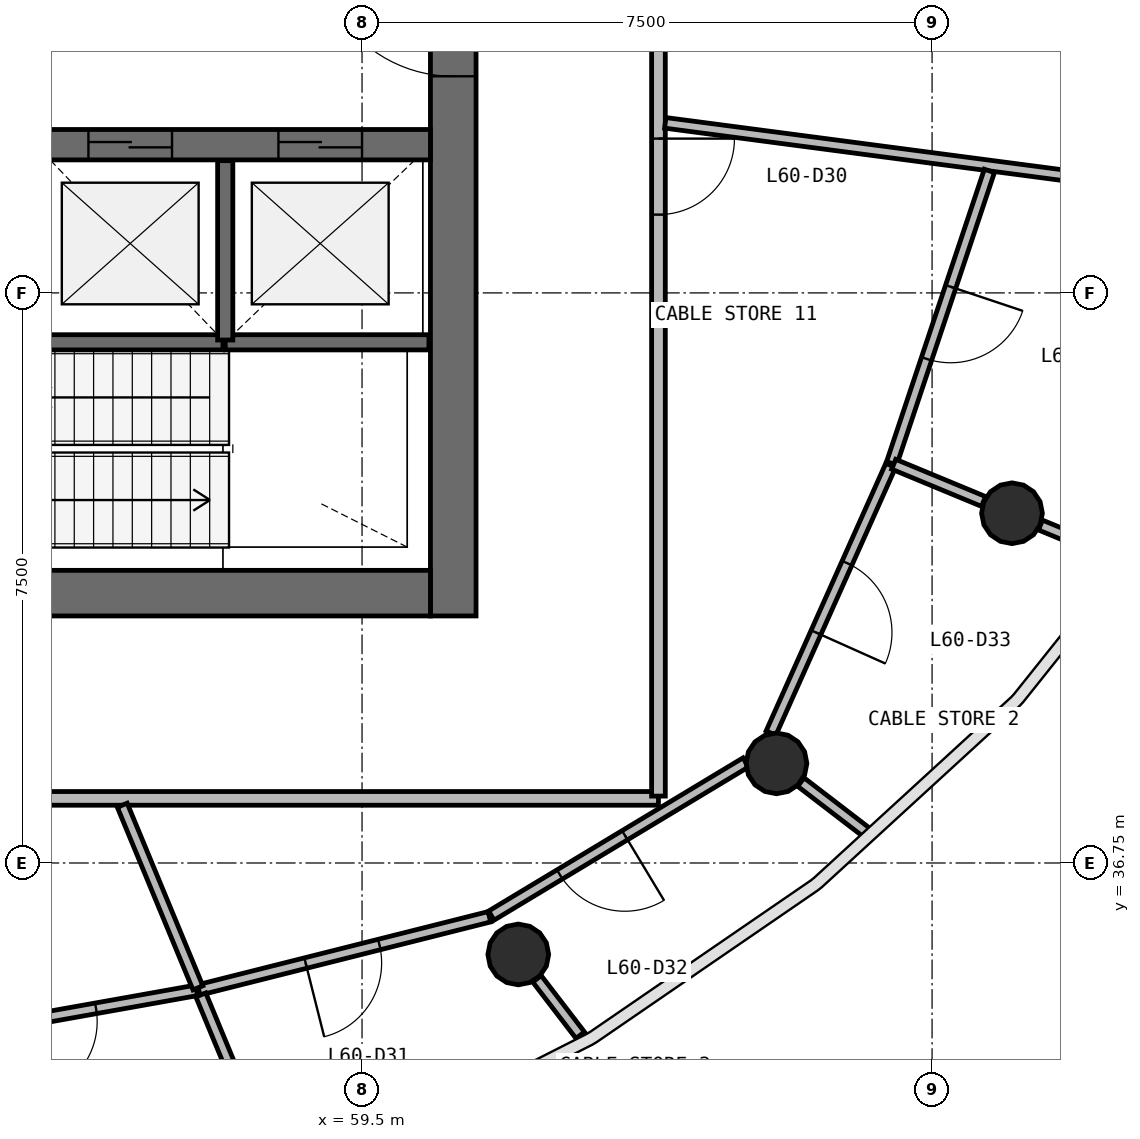
"""IFC4 building model, lengths in metres.
Left out: names, types, materials, properties, quantities, classifications, styles, units other than length and angle.
Written with IfcOpenShell. Run it as: python <this file> out.ifc"""

import sys

from ifc_helpers import new_model, si_unit, direction, frame, frame_2d, origin, origin_2d, place, context, subcontext, project, spatial, rectangle, circle, extrude, source, transform, mapped, element, fill, save


model = new_model("IFC4")
c1 = context("Model", 3, precision=1e-05, world=origin(), true_north=direction((0.0, 1.0)))
c2 = subcontext(c1, "Body", "Model", "MODEL_VIEW")
j1 = project(units=[si_unit("LENGTHUNIT", "METRE"), si_unit("PLANEANGLEUNIT", "RADIAN")], contexts=[c1])
p1 = place(None, origin())
s1 = spatial("IfcSite", under=j1, at=p1, CompositionType="ELEMENT")
p2 = place(p1, origin())
s2 = spatial("IfcBuilding", under=s1, at=p2, CompositionType="ELEMENT")
p3 = place(p2, frame((0.0, 0.0, 246.2)))
s3 = spatial("IfcBuildingStorey", under=s2, at=p3, CompositionType="ELEMENT", Elevation=246.2)
p4 = place(p3, frame((60.7, 40.0, 0.0), z_axis=(0.0, 0.0, 1.0), x_axis=(0.0, 1.0, 0.0)))
e1 = element("IfcWall", 1, at=p4, inside=s3, PredefinedType="SHEAR", context=c2, shape_type="SweptSolid", body=[
    extrude(rectangle(XDim=16.0, YDim=0.6, at=frame_2d((8.0, 0.0))), origin(), (0.0, 0.0, 1.0), 3.9),
])
p5 = place(p4, frame((7.1, 0.0, 0.0)))
e2 = element("IfcOpeningElement", 2, at=p5, cuts=e1, PredefinedType="OPENING", context=c2, shape_type="SweptSolid", body=[
    extrude(rectangle(XDim=1.8, YDim=2.1, at=frame_2d((0.9, 1.05))), frame((0.0, 0.31, 0.0), z_axis=(0.0, -1.0, 0.0), x_axis=(1.0, 0.0, 0.0)), (0.0, 0.0, 1.0), 0.62),
])
p6 = place(p3, frame((43.6, 40.3, 0.0), z_axis=(0.0, 0.0, 1.0), x_axis=(1.0, 0.0, 0.0)))
e3 = element("IfcWall", 3, at=p6, inside=s3, PredefinedType="SHEAR", context=c2, shape_type="SweptSolid", body=[
    extrude(rectangle(XDim=16.8, YDim=0.6, at=frame_2d((8.4, 0.0))), origin(), (0.0, 0.0, 1.0), 3.9),
])
p7 = place(p6, frame((10.3, 0.0, 0.0)))
e4 = element("IfcOpeningElement", 4, at=p7, cuts=e3, PredefinedType="OPENING", context=c2, shape_type="SweptSolid", body=[
    extrude(rectangle(XDim=1.2, YDim=2.1, at=frame_2d((0.6, 1.05))), frame((0.0, 0.31, 0.0), z_axis=(0.0, -1.0, 0.0), x_axis=(1.0, 0.0, 0.0)), (0.0, 0.0, 1.0), 0.62),
])
p8 = place(p6, frame((7.25, 0.0, 0.0)))
e5 = element("IfcOpeningElement", 5, at=p8, cuts=e3, PredefinedType="OPENING", context=c2, shape_type="SweptSolid", body=[
    extrude(rectangle(XDim=1.1, YDim=2.1, at=frame_2d((0.55, 1.05))), frame((0.0, 0.31, 0.0), z_axis=(0.0, -1.0, 0.0), x_axis=(1.0, 0.0, 0.0)), (0.0, 0.0, 1.0), 0.62),
])
p9 = place(p6, frame((0.7, 0.0, 0.0)))
e6 = element("IfcOpeningElement", 6, at=p9, cuts=e3, PredefinedType="OPENING", context=c2, shape_type="SweptSolid", body=[
    extrude(rectangle(XDim=0.8, YDim=2.1, at=frame_2d((0.4, 1.05))), frame((0.0, 0.31, 0.0), z_axis=(0.0, -1.0, 0.0), x_axis=(1.0, 0.0, 0.0)), (0.0, 0.0, 1.0), 0.62),
])
p10 = place(p3, frame((43.6, 46.2, 0.0), z_axis=(0.0, 0.0, 1.0), x_axis=(1.0, 0.0, 0.0)))
e7 = element("IfcWall", 7, at=p10, inside=s3, PredefinedType="SHEAR", context=c2, shape_type="SweptSolid", body=[
    extrude(rectangle(XDim=16.8, YDim=0.4, at=frame_2d((8.4, 0.0))), origin(), (0.0, 0.0, 1.0), 3.9),
])
p11 = place(p10, frame((9.8, 0.0, 0.0)))
e8 = element("IfcOpeningElement", 8, at=p11, cuts=e7, PredefinedType="OPENING", context=c2, shape_type="SweptSolid", body=[
    extrude(rectangle(XDim=1.1, YDim=2.1, at=frame_2d((0.55, 1.05))), frame((0.0, 0.21, 0.0), z_axis=(0.0, -1.0, 0.0), x_axis=(1.0, 0.0, 0.0)), (0.0, 0.0, 1.0), 0.42),
])
p12 = place(p10, frame((12.3, 0.0, 0.0)))
e9 = element("IfcOpeningElement", 9, at=p12, cuts=e7, PredefinedType="OPENING", context=c2, shape_type="SweptSolid", body=[
    extrude(rectangle(XDim=1.1, YDim=2.1, at=frame_2d((0.55, 1.05))), frame((0.0, 0.21, 0.0), z_axis=(0.0, -1.0, 0.0), x_axis=(1.0, 0.0, 0.0)), (0.0, 0.0, 1.0), 0.42),
])
p13 = place(p10, frame((14.8, 0.0, 0.0)))
e10 = element("IfcOpeningElement", 10, at=p13, cuts=e7, PredefinedType="OPENING", context=c2, shape_type="SweptSolid", body=[
    extrude(rectangle(XDim=1.1, YDim=2.1, at=frame_2d((0.55, 1.05))), frame((0.0, 0.21, 0.0), z_axis=(0.0, -1.0, 0.0), x_axis=(1.0, 0.0, 0.0)), (0.0, 0.0, 1.0), 0.42),
])
p14 = place(p10, frame((2.45, 0.0, 0.0)))
e11 = element("IfcOpeningElement", 11, at=p14, cuts=e7, PredefinedType="OPENING", context=c2, shape_type="SweptSolid", body=[
    extrude(rectangle(XDim=0.9, YDim=2.1, at=frame_2d((0.45, 1.05))), frame((0.0, 0.21, 0.0), z_axis=(0.0, -1.0, 0.0), x_axis=(1.0, 0.0, 0.0)), (0.0, 0.0, 1.0), 0.42),
])
p15 = place(p10, frame((7.85, 0.0, 0.0)))
e12 = element("IfcOpeningElement", 12, at=p15, cuts=e7, PredefinedType="OPENING", context=c2, shape_type="SweptSolid", body=[
    extrude(rectangle(XDim=0.9, YDim=2.1, at=frame_2d((0.45, 1.05))), frame((0.0, 0.21, 0.0), z_axis=(0.0, -1.0, 0.0), x_axis=(1.0, 0.0, 0.0)), (0.0, 0.0, 1.0), 0.42),
])
m1 = source(origin(), c2, "Body", "SweptSolid", [
    extrude(circle(Radius=0.4, at=origin_2d()), origin(), (0.0, 0.0, 1.0), 3.9),
])
for number, where, z_axis, x_axis in (
    (13, (61.556, 35.547, 0.0), (0.0, 0.0, 1.0), (1.0, 0.0, 0.0)),
    (14, (64.953, 38.061, 0.0), (0.0, 0.0, 1.0), (1.0, 0.0, 0.0)),
    (15, (68.052, 41.351, 0.0), (0.0, 0.0, 1.0), (1.0, 0.0, 0.0)),
):
    element("IfcColumn", number, at=place(p3, frame(where, z_axis=z_axis, x_axis=x_axis)), inside=s3, PredefinedType="COLUMN", context=c2, shape_type="MappedRepresentation", body=[
        mapped(m1, transform((0.0, 0.0, 0.0), scale=1.0)),
    ])
p16 = place(p3, frame((57.7, 43.6, 0.0), z_axis=(0.0, 0.0, 1.0), x_axis=(1.0, 0.0, 0.0)))
e16 = element("IfcWall", 16, at=p16, inside=s3, PredefinedType="SOLIDWALL", context=c2, shape_type="SweptSolid", body=[
    extrude(rectangle(XDim=2.68, YDim=0.2, at=frame_2d((1.34, 0.0))), origin(), (0.0, 0.0, 1.0), 3.58),
])
p17 = place(p3, frame((55.2, 43.6, 0.0), z_axis=(0.0, 0.0, 1.0), x_axis=(1.0, 0.0, 0.0)))
e17 = element("IfcWall", 17, at=p17, inside=s3, PredefinedType="SOLIDWALL", context=c2, shape_type="SweptSolid", body=[
    extrude(rectangle(XDim=2.47, YDim=0.2, at=frame_2d((1.235, 0.0))), origin(), (0.0, 0.0, 1.0), 3.58),
])
p18 = place(p3, frame((57.7, 43.63, 0.0), z_axis=(0.0, 0.0, 1.0), x_axis=(0.0, 1.0, 0.0)))
e18 = element("IfcWall", 18, at=p18, inside=s3, PredefinedType="SOLIDWALL", context=c2, shape_type="SweptSolid", body=[
    extrude(rectangle(XDim=2.36, YDim=0.2, at=frame_2d((1.18, 0.0))), origin(), (0.0, 0.0, 1.0), 3.58),
])
p19 = place(p3, frame((63.4, 37.6, 0.0), z_axis=(0.0, 0.0, 1.0), x_axis=(-1.0, 0.0, 0.0)))
e19 = element("IfcWall", 19, at=p19, inside=s3, PredefinedType="PARTITIONING", context=c2, shape_type="SweptSolid", body=[
    extrude(rectangle(XDim=22.8, YDim=0.18, at=frame_2d((11.4, 0.0))), origin(), (0.0, 0.0, 1.0), 2.88),
])
p20 = place(p19, frame((12.95, 0.0, 0.0)))
e20 = element("IfcOpeningElement", 20, at=p20, cuts=e19, PredefinedType="OPENING", context=c2, shape_type="SweptSolid", body=[
    extrude(rectangle(XDim=1.0, YDim=2.1, at=frame_2d((0.5, 1.05))), frame((0.0, 0.1, 0.0), z_axis=(0.0, -1.0, 0.0), x_axis=(1.0, 0.0, 0.0)), (0.0, 0.0, 1.0), 0.2),
])
p21 = place(p19, frame((10.95, 0.0, 0.0)))
e21 = element("IfcOpeningElement", 21, at=p21, cuts=e19, PredefinedType="OPENING", context=c2, shape_type="SweptSolid", body=[
    extrude(rectangle(XDim=1.0, YDim=2.1, at=frame_2d((0.5, 1.05))), frame((0.0, 0.1, 0.0), z_axis=(0.0, -1.0, 0.0), x_axis=(1.0, 0.0, 0.0)), (0.0, 0.0, 1.0), 0.2),
])
p22 = place(p3, frame((63.4, 58.37, 0.0), z_axis=(0.0, 0.0, 1.0), x_axis=(0.0, -1.0, 0.0)))
e22 = element("IfcWall", 22, at=p22, inside=s3, PredefinedType="PARTITIONING", context=c2, shape_type="SweptSolid", body=[
    extrude(rectangle(XDim=20.74, YDim=0.18, at=frame_2d((10.37, 0.0))), origin(), (0.0, 0.0, 1.0), 2.88),
])
p23 = place(p22, frame((12.09, 0.0, 0.0)))
e23 = element("IfcOpeningElement", 23, at=p23, cuts=e22, PredefinedType="OPENING", context=c2, shape_type="SweptSolid", body=[
    extrude(rectangle(XDim=1.0, YDim=2.1, at=frame_2d((0.5, 1.05))), frame((0.0, 0.1, 0.0), z_axis=(0.0, -1.0, 0.0), x_axis=(1.0, 0.0, 0.0)), (0.0, 0.0, 1.0), 0.2),
])
p24 = place(p22, frame((9.89, 0.0, 0.0)))
e24 = element("IfcOpeningElement", 24, at=p24, cuts=e22, PredefinedType="OPENING", context=c2, shape_type="SweptSolid", body=[
    extrude(rectangle(XDim=1.0, YDim=2.1, at=frame_2d((0.5, 1.05))), frame((0.0, 0.1, 0.0), z_axis=(0.0, -1.0, 0.0), x_axis=(1.0, 0.0, 0.0)), (0.0, 0.0, 1.0), 0.2),
])
p25 = place(p22, frame((4.29, 0.0, 0.0)))
e25 = element("IfcOpeningElement", 25, at=p25, cuts=e22, PredefinedType="OPENING", context=c2, shape_type="SweptSolid", body=[
    extrude(rectangle(XDim=1.0, YDim=2.1, at=frame_2d((0.5, 1.05))), frame((0.0, 0.1, 0.0), z_axis=(0.0, -1.0, 0.0), x_axis=(1.0, 0.0, 0.0)), (0.0, 0.0, 1.0), 0.2),
])
p26 = place(p3, frame((70.139, 45.612, 0.0), z_axis=(0.0, 0.0, 1.0), x_axis=(-0.991446859335, 0.130511015301, 0.0)))
e26 = element("IfcWall", 26, at=p26, inside=s3, PredefinedType="PARTITIONING", context=c2, shape_type="SweptSolid", body=[
    extrude(rectangle(XDim=6.706, YDim=0.14, at=frame_2d((3.353, 0.0))), origin(), (0.0, 0.0, 1.0), 2.88),
])
p27 = place(p3, frame((67.754, 45.855, 0.0), z_axis=(0.0, 0.0, 1.0), x_axis=(-0.317003922607, -0.94842422631, 0.0)))
e27 = element("IfcWall", 27, at=p27, inside=s3, PredefinedType="PARTITIONING", context=c2, shape_type="SweptSolid", body=[
    extrude(rectangle(XDim=4.057, YDim=0.14, at=frame_2d((2.029, 0.0))), origin(), (0.0, 0.0, 1.0), 2.88),
])
p28 = place(p27, frame((1.607, 0.0, 0.0)))
e28 = element("IfcOpeningElement", 28, at=p28, cuts=e27, PredefinedType="OPENING", context=c2, shape_type="SweptSolid", body=[
    extrude(rectangle(XDim=1.0, YDim=2.1, at=frame_2d((0.5, 1.05))), frame((0.0, 0.08, 0.0), z_axis=(0.0, -1.0, 0.0), x_axis=(1.0, 0.0, 0.0)), (0.0, 0.0, 1.0), 0.16),
])
p29 = place(p3, frame((61.176, 36.042, 0.0), z_axis=(0.0, 0.0, 1.0), x_axis=(-0.969740538579, -0.244137845972, 0.0)))
e29 = element("IfcWall", 29, at=p29, inside=s3, PredefinedType="PARTITIONING", context=c2, shape_type="SweptSolid", body=[
    extrude(rectangle(XDim=3.943, YDim=0.14, at=frame_2d((1.972, 0.0))), origin(), (0.0, 0.0, 1.0), 2.88),
])
p30 = place(p29, frame((1.493, 0.0, 0.0)))
e30 = element("IfcOpeningElement", 30, at=p30, cuts=e29, PredefinedType="OPENING", context=c2, shape_type="SweptSolid", body=[
    extrude(rectangle(XDim=1.0, YDim=2.1, at=frame_2d((0.5, 1.05))), frame((0.0, 0.08, 0.0), z_axis=(0.0, -1.0, 0.0), x_axis=(1.0, 0.0, 0.0)), (0.0, 0.0, 1.0), 0.16),
])
p31 = place(p3, frame((64.549, 38.073, 0.0), z_axis=(0.0, 0.0, 1.0), x_axis=(-0.856692428514, -0.515827570925, 0.0)))
e31 = element("IfcWall", 31, at=p31, inside=s3, PredefinedType="PARTITIONING", context=c2, shape_type="SweptSolid", body=[
    extrude(rectangle(XDim=3.907, YDim=0.14, at=frame_2d((1.954, 0.0))), origin(), (0.0, 0.0, 1.0), 2.88),
])
p32 = place(p31, frame((1.857, 0.0, 0.0)))
e32 = element("IfcOpeningElement", 32, at=p32, cuts=e31, PredefinedType="OPENING", context=c2, shape_type="SweptSolid", body=[
    extrude(rectangle(XDim=1.0, YDim=2.1, at=frame_2d((0.5, 1.05))), frame((0.0, 0.08, 0.0), z_axis=(0.0, -1.0, 0.0), x_axis=(1.0, 0.0, 0.0)), (0.0, 0.0, 1.0), 0.16),
])
p33 = place(p3, frame((66.455, 41.98, 0.0), z_axis=(0.0, 0.0, 1.0), x_axis=(-0.40831609547, -0.912840602833, 0.0)))
e33 = element("IfcWall", 33, at=p33, inside=s3, PredefinedType="PARTITIONING", context=c2, shape_type="SweptSolid", body=[
    extrude(rectangle(XDim=3.857, YDim=0.14, at=frame_2d((1.929, 0.0))), origin(), (0.0, 0.0, 1.0), 2.88),
])
p34 = place(p33, frame((1.407, 0.0, 0.0)))
e34 = element("IfcOpeningElement", 34, at=p34, cuts=e33, PredefinedType="OPENING", context=c2, shape_type="SweptSolid", body=[
    extrude(rectangle(XDim=1.0, YDim=2.1, at=frame_2d((0.5, 1.05))), frame((0.0, 0.08, 0.0), z_axis=(0.0, -1.0, 0.0), x_axis=(1.0, 0.0, 0.0)), (0.0, 0.0, 1.0), 0.16),
])
p35 = place(p3, frame((57.322, 35.074, 0.0), z_axis=(0.0, 0.0, 1.0), x_axis=(-0.984454859215, -0.175637781149, 0.0)))
e35 = element("IfcWall", 35, at=p35, inside=s3, PredefinedType="PARTITIONING", context=c2, shape_type="SweptSolid", body=[
    extrude(rectangle(XDim=3.593, YDim=0.14, at=frame_2d((1.797, 0.0))), origin(), (0.0, 0.0, 1.0), 2.88),
])
p36 = place(p35, frame((1.344, 0.0, 0.0)))
e36 = element("IfcOpeningElement", 36, at=p36, cuts=e35, PredefinedType="OPENING", context=c2, shape_type="SweptSolid", body=[
    extrude(rectangle(XDim=1.0, YDim=2.1, at=frame_2d((0.5, 1.05))), frame((0.0, 0.08, 0.0), z_axis=(0.0, -1.0, 0.0), x_axis=(1.0, 0.0, 0.0)), (0.0, 0.0, 1.0), 0.16),
])
p37 = place(p3, frame((56.345, 37.51, 0.0), z_axis=(0.0, 0.0, 1.0), x_axis=(0.382661342222, -0.923888682239, 0.0)))
e37 = element("IfcWall", 37, at=p37, inside=s3, PredefinedType="PARTITIONING", context=c2, shape_type="SweptSolid", body=[
    extrude(rectangle(XDim=2.601, YDim=0.14, at=frame_2d((1.3, 0.0))), origin(), (0.0, 0.0, 1.0), 2.88),
])
p38 = place(p3, frame((66.495, 41.996, 0.0), z_axis=(0.0, 0.0, 1.0), x_axis=(0.923826077578, -0.382812458505, 0.0)))
e38 = element("IfcWall", 38, at=p38, inside=s3, PredefinedType="PARTITIONING", context=c2, shape_type="SweptSolid", body=[
    extrude(rectangle(XDim=1.279, YDim=0.14, at=frame_2d((0.64, 0.0))), origin(), (0.0, 0.0, 1.0), 2.88),
])
p39 = place(p3, frame((68.426, 41.196, 0.0), z_axis=(0.0, 0.0, 1.0), x_axis=(0.923850829611, -0.382752719947, 0.0)))
e39 = element("IfcWall", 39, at=p39, inside=s3, PredefinedType="PARTITIONING", context=c2, shape_type="SweptSolid", body=[
    extrude(rectangle(XDim=1.201, YDim=0.14, at=frame_2d((0.601, 0.0))), origin(), (0.0, 0.0, 1.0), 2.88),
])
p40 = place(p3, frame((57.379, 35.014, 0.0), z_axis=(0.0, 0.0, 1.0), x_axis=(0.382624538487, -0.923903924955, 0.0)))
e40 = element("IfcWall", 40, at=p40, inside=s3, PredefinedType="PARTITIONING", context=c2, shape_type="SweptSolid", body=[
    extrude(rectangle(XDim=1.054, YDim=0.14, at=frame_2d((0.527, 0.0))), origin(), (0.0, 0.0, 1.0), 2.88),
])
p41 = place(p3, frame((65.274, 37.814, 0.0), z_axis=(0.0, 0.0, 1.0), x_axis=(0.793403043082, -0.608696649596, 0.0)))
e41 = element("IfcWall", 41, at=p41, inside=s3, PredefinedType="PARTITIONING", context=c2, shape_type="SweptSolid", body=[
    extrude(rectangle(XDim=1.083, YDim=0.14, at=frame_2d((0.541, 0.0))), origin(), (0.0, 0.0, 1.0), 2.88),
])
p42 = place(p3, frame((61.802, 35.226, 0.0), z_axis=(0.0, 0.0, 1.0), x_axis=(0.60870024899, -0.793400281623, 0.0)))
e42 = element("IfcWall", 42, at=p42, inside=s3, PredefinedType="PARTITIONING", context=c2, shape_type="SweptSolid", body=[
    extrude(rectangle(XDim=0.935, YDim=0.14, at=frame_2d((0.467, 0.0))), origin(), (0.0, 0.0, 1.0), 2.88),
])
m2 = source(origin(), c2, "Body", "SweptSolid", [
    extrude(rectangle(XDim=1.8, YDim=2.1, at=frame_2d((0.9, 1.05))), frame((0.0, 0.025, 0.0), z_axis=(0.0, -1.0, 0.0), x_axis=(1.0, 0.0, 0.0)), (0.0, 0.0, 1.0), 0.05),
])
p43 = place(p5, origin())
e43 = element("IfcDoor", 43, at=p43, inside=s3, OperationType="SINGLE_SWING_RIGHT", PredefinedType="DOOR", context=c2, shape_type="MappedRepresentation", body=[
    mapped(m2, transform((0.0, 0.0, 0.0), scale=1.0)),
])
fill(e2, e43)
m3 = source(origin(), c2, "Body", "SweptSolid", [
    extrude(rectangle(XDim=1.1, YDim=2.1, at=frame_2d((0.55, 1.05))), frame((0.0, 0.025, 0.0), z_axis=(0.0, -1.0, 0.0), x_axis=(1.0, 0.0, 0.0)), (0.0, 0.0, 1.0), 0.05),
])
p44 = place(p12, origin())
e44 = element("IfcDoor", 44, at=p44, inside=s3, OperationType="DOUBLE_DOOR_SLIDING", PredefinedType="USERDEFINED", context=c2, shape_type="MappedRepresentation", body=[
    mapped(m3, transform((0.0, 0.0, 0.0), scale=1.0)),
])
fill(e9, e44)
p45 = place(p13, origin())
e45 = element("IfcDoor", 45, at=p45, inside=s3, OperationType="DOUBLE_DOOR_SLIDING", PredefinedType="USERDEFINED", context=c2, shape_type="MappedRepresentation", body=[
    mapped(m3, transform((0.0, 0.0, 0.0), scale=1.0)),
])
fill(e10, e45)
m4 = source(origin(), c2, "Body", "SweptSolid", [
    extrude(rectangle(XDim=1.0, YDim=2.1, at=frame_2d((0.5, 1.05))), frame((0.0, 0.025, 0.0), z_axis=(0.0, -1.0, 0.0), x_axis=(1.0, 0.0, 0.0)), (0.0, 0.0, 1.0), 0.05),
])
p46 = place(p36, origin())
e46 = element("IfcDoor", 46, at=p46, inside=s3, OperationType="SINGLE_SWING_RIGHT", PredefinedType="DOOR", context=c2, shape_type="MappedRepresentation", body=[
    mapped(m4, transform((0.0, 0.0, 0.0), scale=1.0)),
])
fill(e36, e46)
p47 = place(p23, origin())
e47 = element("IfcDoor", 47, at=p47, inside=s3, OperationType="SINGLE_SWING_LEFT", PredefinedType="DOOR", context=c2, shape_type="MappedRepresentation", body=[
    mapped(m4, transform((0.0, 0.0, 0.0), scale=1.0)),
])
fill(e23, e47)
p48 = place(p30, origin())
e48 = element("IfcDoor", 48, at=p48, inside=s3, OperationType="SINGLE_SWING_RIGHT", PredefinedType="DOOR", context=c2, shape_type="MappedRepresentation", body=[
    mapped(m4, transform((0.0, 0.0, 0.0), scale=1.0)),
])
fill(e30, e48)
p49 = place(p32, origin())
e49 = element("IfcDoor", 49, at=p49, inside=s3, OperationType="SINGLE_SWING_LEFT", PredefinedType="DOOR", context=c2, shape_type="MappedRepresentation", body=[
    mapped(m4, transform((0.0, 0.0, 0.0), scale=1.0)),
])
fill(e32, e49)
p50 = place(p34, origin())
e50 = element("IfcDoor", 50, at=p50, inside=s3, OperationType="SINGLE_SWING_RIGHT", PredefinedType="DOOR", context=c2, shape_type="MappedRepresentation", body=[
    mapped(m4, transform((0.0, 0.0, 0.0), scale=1.0)),
])
fill(e34, e50)
p51 = place(p28, origin())
e51 = element("IfcDoor", 51, at=p51, inside=s3, OperationType="SINGLE_SWING_LEFT", PredefinedType="DOOR", context=c2, shape_type="MappedRepresentation", body=[
    mapped(m4, transform((0.0, 0.0, 0.0), scale=1.0)),
])
fill(e28, e51)
save(model, sys.argv[1])
